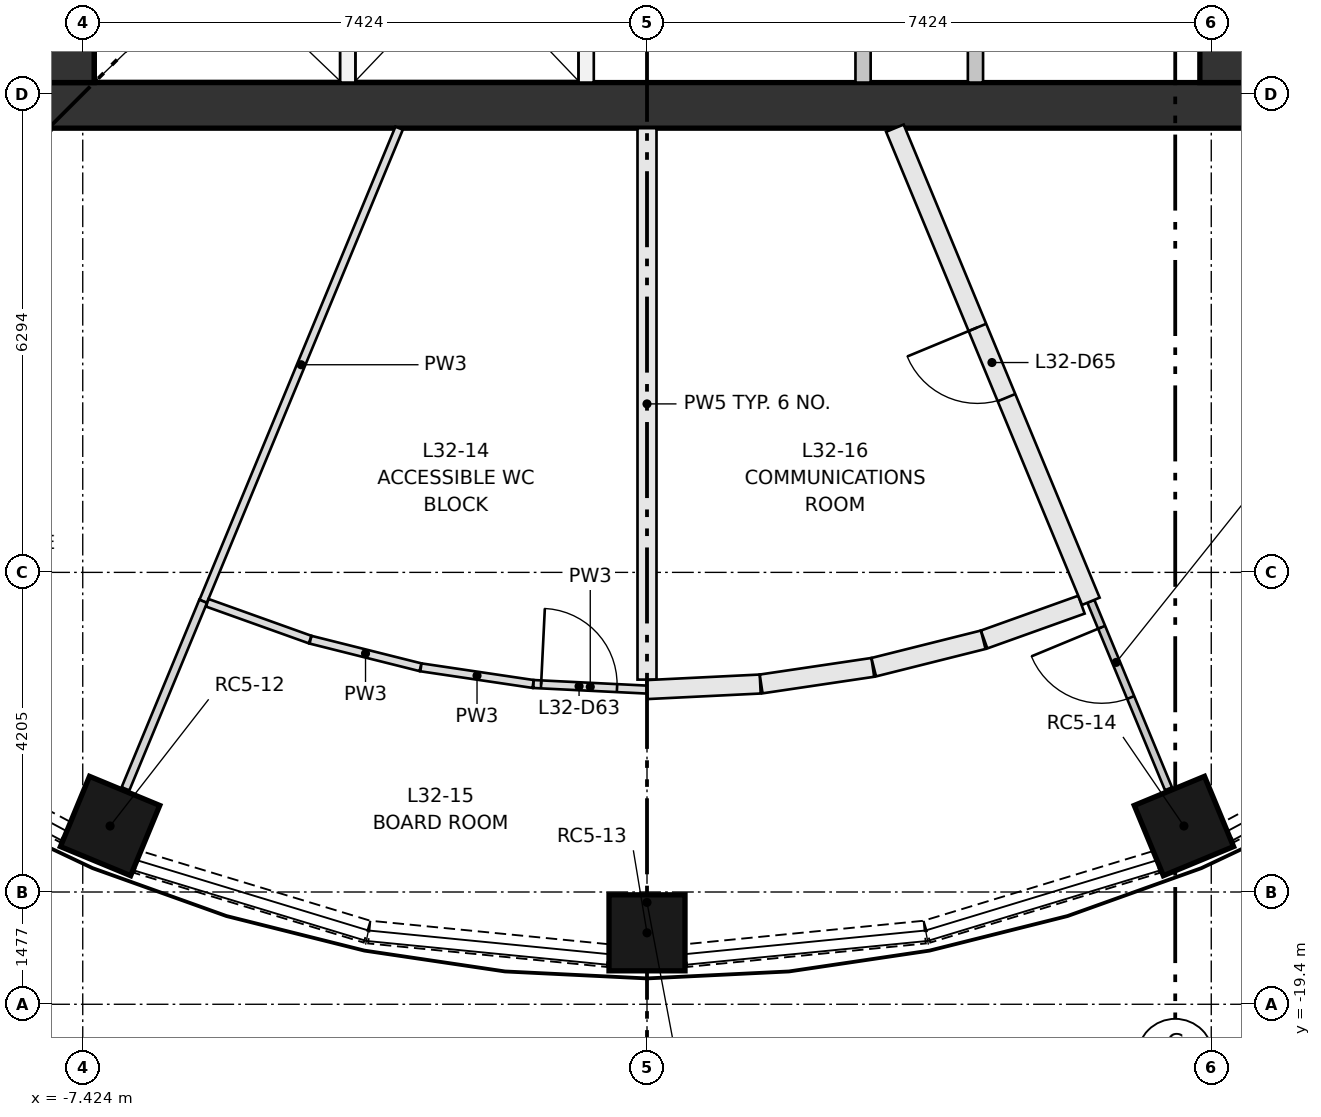
"""IFC4 building model, lengths in metres.
Left out: names, types, materials, properties, quantities, classifications, styles, units other than length and angle.
Written with IfcOpenShell. Run it as: python <this file> out.ifc"""

import sys

from ifc_helpers import new_model, si_unit, direction, frame, frame_2d, origin, origin_2d, place, context, subcontext, project, spatial, rectangle, extrude, element, fill, save


model = new_model("IFC4")
c1 = context("Model", 3, precision=1e-05, world=origin(), true_north=direction((0.0, 1.0)))
c2 = subcontext(c1, "Body", "Model", "MODEL_VIEW")
j1 = project(units=[si_unit("LENGTHUNIT", "METRE"), si_unit("PLANEANGLEUNIT", "RADIAN")], contexts=[c1])
p1 = place(None, origin())
s1 = spatial("IfcSite", under=j1, at=p1, CompositionType="ELEMENT")
p2 = place(p1, origin())
s2 = spatial("IfcBuilding", under=s1, at=p2, CompositionType="ELEMENT")
p3 = place(p2, frame((0.0, 0.0, 124.3)))
s3 = spatial("IfcBuildingStorey", under=s2, at=p3, CompositionType="ELEMENT", Elevation=124.3)
for number, where, z_axis, x_axis in (
    (1, (-7.064, -17.055, 0.0), (0.0, 0.0, 1.0), (-0.383, -0.924, 0.0)),
    (2, (0.0, -18.46, 0.0), (0.0, 0.0, 1.0), (0.0, -1.0, 0.0)),
    (3, (7.064, -17.055, 0.0), (0.0, 0.0, 1.0), (0.383, -0.924, 0.0)),
):
    element("IfcColumn", number, at=place(p3, frame(where, z_axis=z_axis, x_axis=x_axis)), inside=s3, PredefinedType="COLUMN", context=c2, shape_type="SweptSolid", body=[
        extrude(rectangle(XDim=1.0, YDim=1.0, at=origin_2d()), origin(), (0.0, 0.0, 1.0), 3.35),
    ])
p4 = place(p3, frame((-7.874, -7.574, 0.0), z_axis=(0.0, 0.0, 1.0), x_axis=(1.0, 0.0, 0.0)))
e4 = element("IfcWall", 4, at=p4, inside=s3, PredefinedType="SHEAR", context=c2, shape_type="SweptSolid", body=[
    extrude(rectangle(XDim=15.748, YDim=0.6, at=frame_2d((7.874, 0.0))), origin(), (0.0, 0.0, 1.0), 3.35),
])
p5 = place(p3, frame((-7.574, -7.274, 0.0), z_axis=(0.0, 0.0, 1.0), x_axis=(0.0, 1.0, 0.0)))
e5 = element("IfcWall", 5, at=p5, inside=s3, PredefinedType="SHEAR", context=c2, shape_type="SweptSolid", body=[
    extrude(rectangle(XDim=14.548, YDim=0.6, at=frame_2d((7.274, 0.0))), origin(), (0.0, 0.0, 1.0), 3.35),
])
p6 = place(p5, frame((6.774, 0.0, 0.0)))
e6 = element("IfcOpeningElement", 6, at=p6, cuts=e5, PredefinedType="OPENING", context=c2, shape_type="SweptSolid", body=[
    extrude(rectangle(XDim=1.0, YDim=2.1, at=frame_2d((0.5, 1.05))), frame((0.0, 0.31, 0.0), z_axis=(0.0, -1.0, 0.0), x_axis=(1.0, 0.0, 0.0)), (0.0, 0.0, 1.0), 0.62),
])
p7 = place(p5, frame((3.649, 0.0, 0.0)))
e7 = element("IfcOpeningElement", 7, at=p7, cuts=e5, PredefinedType="OPENING", context=c2, shape_type="SweptSolid", body=[
    extrude(rectangle(XDim=1.8, YDim=2.1, at=frame_2d((0.9, 1.05))), frame((0.0, 0.31, 0.0), z_axis=(0.0, -1.0, 0.0), x_axis=(1.0, 0.0, 0.0)), (0.0, 0.0, 1.0), 0.62),
])
p8 = place(p5, frame((9.098, 0.0, 0.0)))
e8 = element("IfcOpeningElement", 8, at=p8, cuts=e5, PredefinedType="OPENING", context=c2, shape_type="SweptSolid", body=[
    extrude(rectangle(XDim=1.8, YDim=2.1, at=frame_2d((0.9, 1.05))), frame((0.0, 0.31, 0.0), z_axis=(0.0, -1.0, 0.0), x_axis=(1.0, 0.0, 0.0)), (0.0, 0.0, 1.0), 0.62),
])
p9 = place(p3, frame((7.574, -7.274, 0.0), z_axis=(0.0, 0.0, 1.0), x_axis=(0.0, 1.0, 0.0)))
e9 = element("IfcWall", 9, at=p9, inside=s3, PredefinedType="SHEAR", context=c2, shape_type="SweptSolid", body=[
    extrude(rectangle(XDim=14.548, YDim=0.6, at=frame_2d((7.274, 0.0))), origin(), (0.0, 0.0, 1.0), 3.35),
])
p10 = place(p9, frame((6.774, 0.0, 0.0)))
e10 = element("IfcOpeningElement", 10, at=p10, cuts=e9, PredefinedType="OPENING", context=c2, shape_type="SweptSolid", body=[
    extrude(rectangle(XDim=1.0, YDim=2.1, at=frame_2d((0.5, 1.05))), frame((0.0, 0.31, 0.0), z_axis=(0.0, -1.0, 0.0), x_axis=(1.0, 0.0, 0.0)), (0.0, 0.0, 1.0), 0.62),
])
p11 = place(p9, frame((3.649, 0.0, 0.0)))
e11 = element("IfcOpeningElement", 11, at=p11, cuts=e9, PredefinedType="OPENING", context=c2, shape_type="SweptSolid", body=[
    extrude(rectangle(XDim=1.8, YDim=2.1, at=frame_2d((0.9, 1.05))), frame((0.0, 0.31, 0.0), z_axis=(0.0, -1.0, 0.0), x_axis=(1.0, 0.0, 0.0)), (0.0, 0.0, 1.0), 0.62),
])
p12 = place(p9, frame((9.098, 0.0, 0.0)))
e12 = element("IfcOpeningElement", 12, at=p12, cuts=e9, PredefinedType="OPENING", context=c2, shape_type="SweptSolid", body=[
    extrude(rectangle(XDim=1.8, YDim=2.1, at=frame_2d((0.9, 1.05))), frame((0.0, 0.31, 0.0), z_axis=(0.0, -1.0, 0.0), x_axis=(1.0, 0.0, 0.0)), (0.0, 0.0, 1.0), 0.62),
])
for number, where, z_axis, x_axis in (
    (13, (-3.937, -7.274, 0.0), (0.0, 0.0, 1.0), (0.0, 1.0, 0.0)),
    (14, (-0.8, -7.274, 0.0), (0.0, 0.0, 1.0), (0.0, 1.0, 0.0)),
    (15, (2.843, -7.274, 0.0), (0.0, 0.0, 1.0), (0.0, 1.0, 0.0)),
    (16, (4.322, -7.274, 0.0), (0.0, 0.0, 1.0), (0.0, 1.0, 0.0)),
):
    element("IfcWall", number, at=place(p3, frame(where, z_axis=z_axis, x_axis=x_axis)), inside=s3, PredefinedType="PARTITIONING", context=c2, shape_type="SweptSolid", body=[
        extrude(rectangle(XDim=3.1, YDim=0.2, at=frame_2d((1.55, 0.0))), origin(), (0.0, 0.0, 1.0), 3.0),
    ])
p13 = place(p3, frame((-10.437, -15.647, 0.0), z_axis=(0.0, 0.0, 1.0), x_axis=(0.881851238747, -0.471527722113, 0.0)))
e17 = element("IfcWall", 17, at=p13, inside=s3, PredefinedType="SOLIDWALL", context=c2, shape_type="SweptSolid", body=[
    extrude(rectangle(XDim=3.155, YDim=0.3, at=frame_2d((1.578, 0.0))), origin(), (0.0, 0.0, 1.0), 0.9),
])
p14 = place(p3, frame((-6.705, -17.527, 0.0), z_axis=(0.0, 0.0, 1.0), x_axis=(0.956874051907, -0.290503096001, 0.0)))
e18 = element("IfcWall", 18, at=p14, inside=s3, PredefinedType="SOLIDWALL", context=c2, shape_type="SweptSolid", body=[
    extrude(rectangle(XDim=3.157, YDim=0.3, at=frame_2d((1.579, 0.0))), origin(), (0.0, 0.0, 1.0), 0.9),
])
for number, where, z_axis, x_axis in (
    (19, (-3.654, -18.45, 0.0), (0.0, 0.0, 1.0), (0.995, -0.098, 0.0)),
    (20, (0.514, -18.76, 0.0), (0.0, 0.0, 1.0), (0.995, 0.098, 0.0)),
):
    element("IfcWall", number, at=place(p3, frame(where, z_axis=z_axis, x_axis=x_axis)), inside=s3, PredefinedType="SOLIDWALL", context=c2, shape_type="SweptSolid", body=[
        extrude(rectangle(XDim=3.155, YDim=0.3, at=frame_2d((1.578, 0.0))), origin(), (0.0, 0.0, 1.0), 0.9),
    ])
p15 = place(p3, frame((3.683, -18.445, 0.0), z_axis=(0.0, 0.0, 1.0), x_axis=(0.956874051907, 0.290503096001, 0.0)))
e21 = element("IfcWall", 21, at=p15, inside=s3, PredefinedType="SOLIDWALL", context=c2, shape_type="SweptSolid", body=[
    extrude(rectangle(XDim=3.157, YDim=0.3, at=frame_2d((1.579, 0.0))), origin(), (0.0, 0.0, 1.0), 0.9),
])
p16 = place(p3, frame((7.654, -17.135, 0.0), z_axis=(0.0, 0.0, 1.0), x_axis=(0.881851238747, 0.471527722113, 0.0)))
e22 = element("IfcWall", 22, at=p16, inside=s3, PredefinedType="SOLIDWALL", context=c2, shape_type="SweptSolid", body=[
    extrude(rectangle(XDim=3.155, YDim=0.3, at=frame_2d((1.578, 0.0))), origin(), (0.0, 0.0, 1.0), 0.9),
])
p17 = place(p3, frame((-3.261, -7.874, 0.0), z_axis=(0.0, 0.0, 1.0), x_axis=(-0.382671840259, -0.923884334034, 0.0)))
e23 = element("IfcWall", 23, at=p17, inside=s3, PredefinedType="PARTITIONING", context=c2, shape_type="SweptSolid", body=[
    extrude(rectangle(XDim=6.737, YDim=0.105, at=frame_2d((3.369, 0.0))), origin(), (0.0, 0.0, 1.0), 3.0),
])
p18 = place(p3, frame((-5.84, -14.098, 0.0), z_axis=(0.0, 0.0, 1.0), x_axis=(-0.382744787218, -0.923854116112, 0.0)))
e24 = element("IfcWall", 24, at=p18, inside=s3, PredefinedType="PARTITIONING", context=c2, shape_type="SweptSolid", body=[
    extrude(rectangle(XDim=2.67, YDim=0.11, at=frame_2d((1.335, 0.0))), origin(), (0.0, 0.0, 1.0), 3.0),
])
p19 = place(p3, frame((-4.432, -14.602, 0.0), z_axis=(0.0, 0.0, 1.0), x_axis=(-0.941561150217, 0.336842100105, 0.0)))
e25 = element("IfcWall", 25, at=p19, inside=s3, PredefinedType="PARTITIONING", context=c2, shape_type="SweptSolid", body=[
    extrude(rectangle(XDim=1.437, YDim=0.105, at=frame_2d((0.719, 0.0))), origin(), (0.0, 0.0, 1.0), 3.0),
])
for number, where, z_axis, x_axis in (
    (26, (-2.979, -14.966, 0.0), (0.0, 0.0, 1.0), (-0.97, 0.243, 0.0)),
    (27, (-1.498, -15.186, 0.0), (0.0, 0.0, 1.0), (-0.989, 0.147, 0.0)),
):
    element("IfcWall", number, at=place(p3, frame(where, z_axis=z_axis, x_axis=x_axis)), inside=s3, PredefinedType="PARTITIONING", context=c2, shape_type="SweptSolid", body=[
        extrude(rectangle(XDim=1.492, YDim=0.105, at=frame_2d((0.746, 0.0))), origin(), (0.0, 0.0, 1.0), 3.0),
    ])
p20 = place(p3, frame((-1.493, -15.187, 0.0), z_axis=(0.0, 0.0, 1.0), x_axis=(0.99879112895, -0.049155678518, 0.0)))
e28 = element("IfcWall", 28, at=p20, inside=s3, PredefinedType="PARTITIONING", context=c2, shape_type="SweptSolid", body=[
    extrude(rectangle(XDim=1.495, YDim=0.105, at=frame_2d((0.748, 0.0))), origin(), (0.0, 0.0, 1.0), 3.0),
])
p21 = place(p20, frame((0.1, 0.0, 0.0)))
e29 = element("IfcOpeningElement", 29, at=p21, cuts=e28, PredefinedType="OPENING", context=c2, shape_type="SweptSolid", body=[
    extrude(rectangle(XDim=1.0, YDim=2.1, at=frame_2d((0.5, 1.05))), frame((0.0, 0.062, 0.0), z_axis=(0.0, -1.0, 0.0), x_axis=(1.0, 0.0, 0.0)), (0.0, 0.0, 1.0), 0.125),
])
p22 = place(p3, frame((0.0, -7.874, 0.0), z_axis=(0.0, 0.0, 1.0), x_axis=(0.0, -1.0, 0.0)))
e30 = element("IfcWall", 30, at=p22, inside=s3, PredefinedType="PARTITIONING", context=c2, shape_type="SweptSolid", body=[
    extrude(rectangle(XDim=7.255, YDim=0.25, at=frame_2d((3.627, 0.0))), origin(), (0.0, 0.0, 1.0), 3.0),
])
p23 = place(p3, frame((0.0, -15.26, 0.0), z_axis=(0.0, 0.0, 1.0), x_axis=(0.99879323204, 0.049112927325, 0.0)))
e31 = element("IfcWall", 31, at=p23, inside=s3, PredefinedType="PARTITIONING", context=c2, shape_type="SweptSolid", body=[
    extrude(rectangle(XDim=1.491, YDim=0.25, at=frame_2d((0.746, 0.0))), origin(), (0.0, 0.0, 1.0), 3.0),
])
p24 = place(p3, frame((1.502, -15.186, 0.0), z_axis=(0.0, 0.0, 1.0), x_axis=(0.989192869337, 0.146620146136, 0.0)))
e32 = element("IfcWall", 32, at=p24, inside=s3, PredefinedType="PARTITIONING", context=c2, shape_type="SweptSolid", body=[
    extrude(rectangle(XDim=1.485, YDim=0.25, at=frame_2d((0.743, 0.0))), origin(), (0.0, 0.0, 1.0), 3.0),
])
p25 = place(p3, frame((2.983, -14.965, 0.0), z_axis=(0.0, 0.0, 1.0), x_axis=(0.970026334084, 0.24299981725, 0.0)))
e33 = element("IfcWall", 33, at=p25, inside=s3, PredefinedType="PARTITIONING", context=c2, shape_type="SweptSolid", body=[
    extrude(rectangle(XDim=1.485, YDim=0.25, at=frame_2d((0.742, 0.0))), origin(), (0.0, 0.0, 1.0), 3.0),
])
p26 = place(p3, frame((4.436, -14.601, 0.0), z_axis=(0.0, 0.0, 1.0), x_axis=(0.941526469986, 0.336939024626, 0.0)))
e34 = element("IfcWall", 34, at=p26, inside=s3, PredefinedType="PARTITIONING", context=c2, shape_type="SweptSolid", body=[
    extrude(rectangle(XDim=1.36, YDim=0.25, at=frame_2d((0.68, 0.0))), origin(), (0.0, 0.0, 1.0), 3.0),
])
p27 = place(p3, frame((6.862, -16.565, 0.0), z_axis=(0.0, 0.0, 1.0), x_axis=(-0.382744787218, 0.923854116112, 0.0)))
e35 = element("IfcWall", 35, at=p27, inside=s3, PredefinedType="PARTITIONING", context=c2, shape_type="SweptSolid", body=[
    extrude(rectangle(XDim=2.67, YDim=0.1, at=frame_2d((1.335, 0.0))), origin(), (0.0, 0.0, 1.0), 3.0),
])
p28 = place(p27, frame((1.3, 0.0, 0.0)))
e36 = element("IfcOpeningElement", 36, at=p28, cuts=e35, PredefinedType="OPENING", context=c2, shape_type="SweptSolid", body=[
    extrude(rectangle(XDim=1.0, YDim=2.1, at=frame_2d((0.5, 1.05))), frame((0.0, 0.06, 0.0), z_axis=(0.0, -1.0, 0.0), x_axis=(1.0, 0.0, 0.0)), (0.0, 0.0, 1.0), 0.12),
])
p29 = place(p3, frame((5.84, -14.098, 0.0), z_axis=(0.0, 0.0, 1.0), x_axis=(-0.382671840259, 0.923884334034, 0.0)))
e37 = element("IfcWall", 37, at=p29, inside=s3, PredefinedType="PARTITIONING", context=c2, shape_type="SweptSolid", body=[
    extrude(rectangle(XDim=6.737, YDim=0.25, at=frame_2d((3.369, 0.0))), origin(), (0.0, 0.0, 1.0), 3.0),
])
p30 = place(p29, frame((2.9, 0.0, 0.0)))
e38 = element("IfcOpeningElement", 38, at=p30, cuts=e37, PredefinedType="OPENING", context=c2, shape_type="SweptSolid", body=[
    extrude(rectangle(XDim=1.0, YDim=2.1, at=frame_2d((0.5, 1.05))), frame((0.0, 0.135, 0.0), z_axis=(0.0, -1.0, 0.0), x_axis=(1.0, 0.0, 0.0)), (0.0, 0.0, 1.0), 0.27),
])
p31 = place(p21, origin())
e39 = element("IfcDoor", 39, at=p31, inside=s3, OperationType="SINGLE_SWING_LEFT", PredefinedType="DOOR", context=c2, shape_type="SweptSolid", body=[
    extrude(rectangle(XDim=1.0, YDim=2.1, at=frame_2d((0.5, 1.05))), frame((0.0, 0.025, 0.0), z_axis=(0.0, -1.0, 0.0), x_axis=(1.0, 0.0, 0.0)), (0.0, 0.0, 1.0), 0.05),
])
fill(e29, e39)
p32 = place(p28, origin())
e40 = element("IfcDoor", 40, at=p32, inside=s3, OperationType="SINGLE_SWING_RIGHT", PredefinedType="DOOR", context=c2, shape_type="SweptSolid", body=[
    extrude(rectangle(XDim=1.0, YDim=2.1, at=frame_2d((0.5, 1.05))), frame((0.0, 0.025, 0.0), z_axis=(0.0, -1.0, 0.0), x_axis=(1.0, 0.0, 0.0)), (0.0, 0.0, 1.0), 0.05),
])
fill(e36, e40)
p33 = place(p30, origin())
e41 = element("IfcDoor", 41, at=p33, inside=s3, OperationType="SINGLE_SWING_RIGHT", PredefinedType="DOOR", context=c2, shape_type="SweptSolid", body=[
    extrude(rectangle(XDim=1.0, YDim=2.1, at=frame_2d((0.5, 1.05))), frame((0.0, 0.025, 0.0), z_axis=(0.0, -1.0, 0.0), x_axis=(1.0, 0.0, 0.0)), (0.0, 0.0, 1.0), 0.05),
])
fill(e38, e41)
save(model, sys.argv[1])
